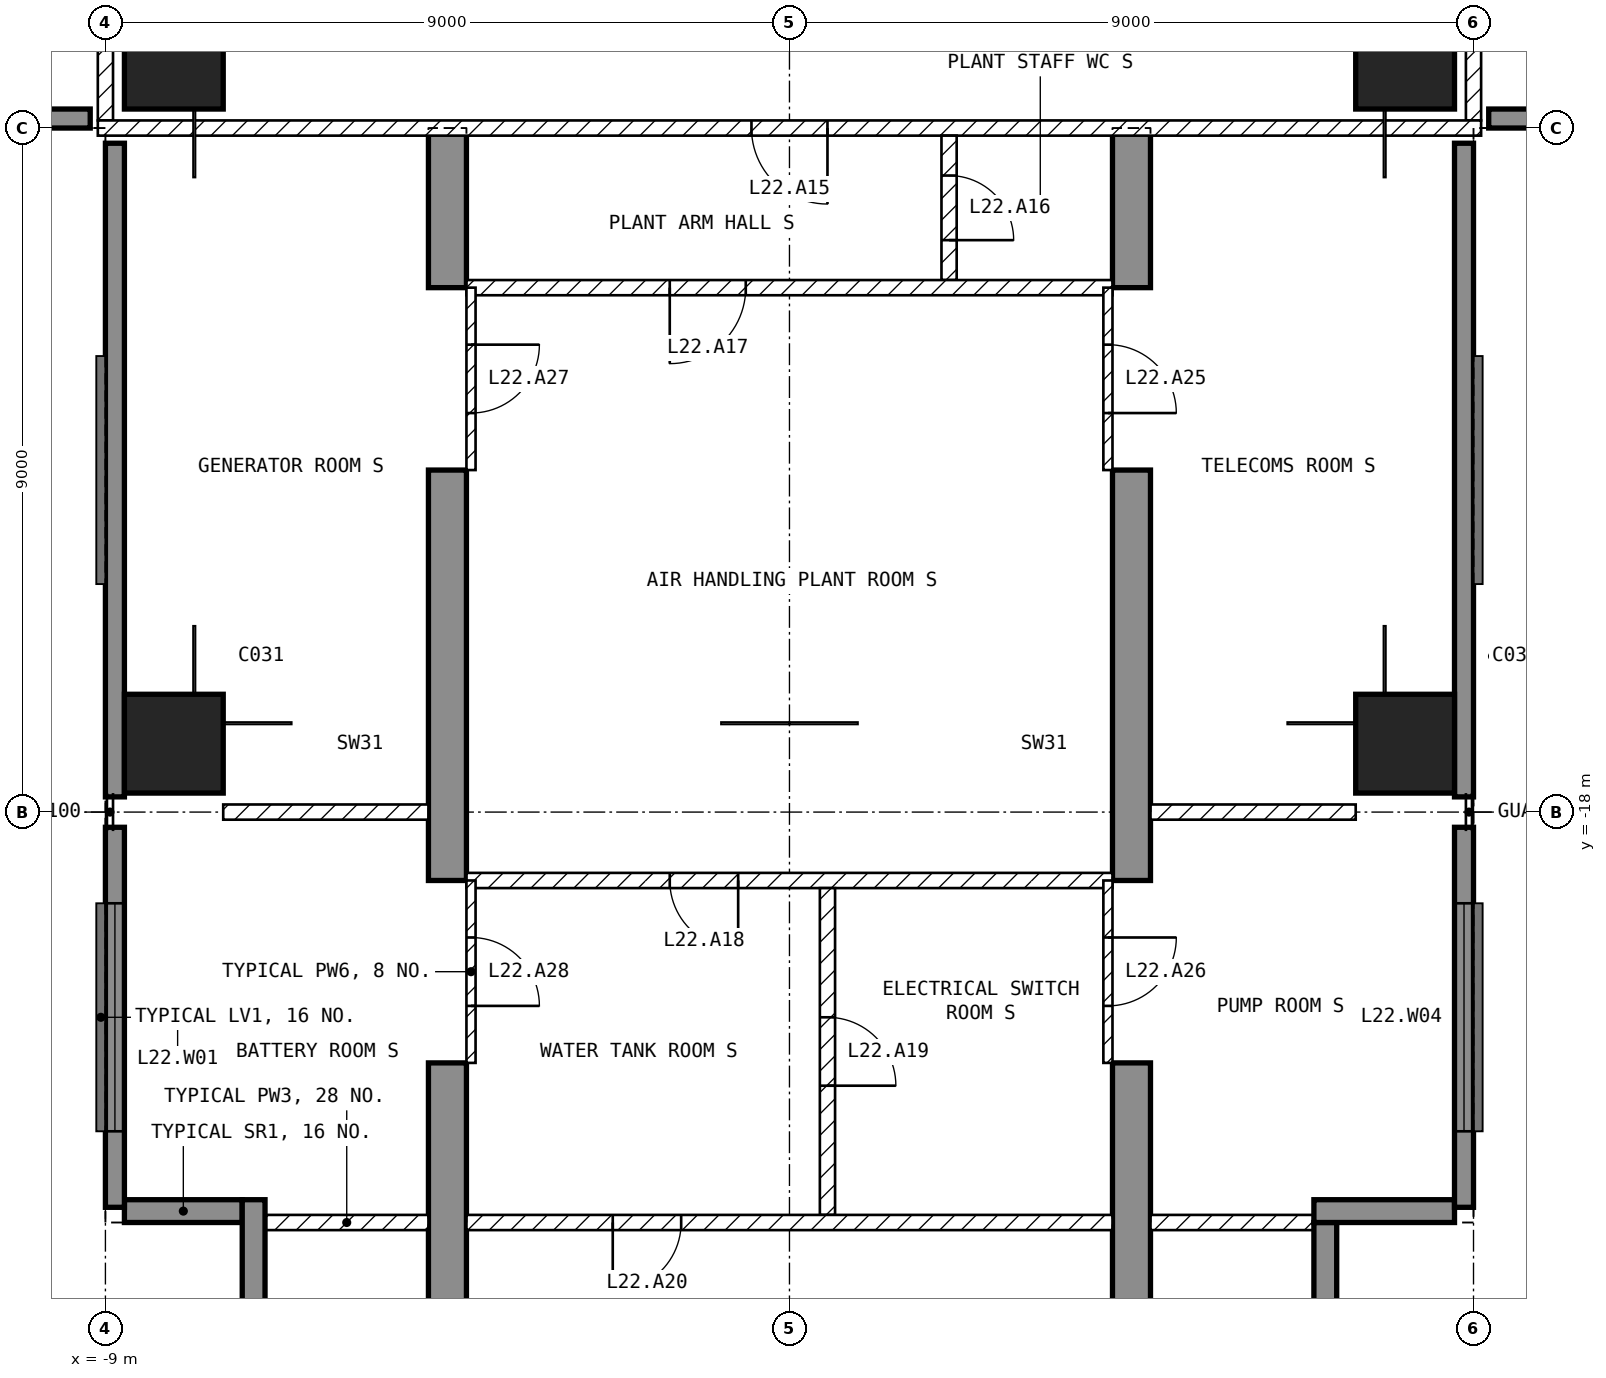
"""IFC4 building model, lengths in metres.
Left out: names, types, materials, properties, quantities, classifications, styles, units other than length and angle.
Written with IfcOpenShell. Run it as: python <this file> out.ifc"""

import sys

from ifc_helpers import new_model, si_unit, direction, frame, frame_2d, origin, origin_2d, place, context, subcontext, project, spatial, polyline, rectangle, outline, extrude, element, fill, save


model = new_model("IFC4")
c1 = context("Model", 3, precision=1e-05, world=origin(), true_north=direction((0.0, 1.0)))
c2 = subcontext(c1, "Body", "Model", "MODEL_VIEW")
j1 = project(units=[si_unit("LENGTHUNIT", "METRE"), si_unit("PLANEANGLEUNIT", "RADIAN")], contexts=[c1])
p1 = place(None, origin())
s1 = spatial("IfcSite", under=j1, at=p1, CompositionType="ELEMENT")
p2 = place(p1, origin())
s2 = spatial("IfcBuilding", under=s1, at=p2, CompositionType="ELEMENT")
p3 = place(p2, frame((0.0, 0.0, 97.9)))
s3 = spatial("IfcBuildingStorey", under=s2, at=p3, CompositionType="ELEMENT", Elevation=97.9)
for number, where, z_axis, x_axis in (
    (1, (-8.1, -17.1, -0.45), (0.0, 0.0, 1.0), (1.0, 0.0, 0.0)),
    (2, (-8.1, -8.1, -0.45), (0.0, 0.0, 1.0), (1.0, 0.0, 0.0)),
    (3, (8.1, -17.1, -0.45), (0.0, 0.0, 1.0), (1.0, 0.0, 0.0)),
    (4, (8.1, -8.1, -0.45), (0.0, 0.0, 1.0), (1.0, 0.0, 0.0)),
):
    element("IfcColumn", number, at=place(p3, frame(where, z_axis=z_axis, x_axis=x_axis)), inside=s3, PredefinedType="COLUMN", context=c2, shape_type="SweptSolid", body=[
        extrude(rectangle(XDim=1.3, YDim=1.3, at=origin_2d()), origin(), (0.0, 0.0, 1.0), 4.7),
    ])
for number, where, z_axis, x_axis in (
    (5, (-4.75, -25.2, -0.45), (1.0, 0.0, 0.0), (0.0, 1.0, 0.0)),
    (6, (4.25, -25.2, -0.45), (1.0, 0.0, 0.0), (0.0, 1.0, 0.0)),
):
    element("IfcWall", number, at=place(p3, frame(where, z_axis=z_axis, x_axis=x_axis)), inside=s3, PredefinedType="SHEAR", context=c2, shape_type="SweptSolid", body=[
        extrude(outline(polyline([(0.0, 0.0), (3.9, 0.0), (3.9, 2.85), (6.3, 2.85), (6.3, 0.0), (11.7, 0.0), (11.7, 2.85), (14.1, 2.85), (14.1, 0.0), (16.2, 0.0), (16.2, 4.7), (0.0, 4.7), (0.0, 0.0)])), origin(), (0.0, 0.0, 1.0), 0.5),
    ])
for number, where, z_axis, x_axis in (
    (7, (-17.8, -8.875, 0.0), (0.0, 0.0, 1.0), (1.0, 0.0, 0.0)),
    (8, (-8.875, -9.2, 0.0), (0.0, 0.0, 1.0), (0.0, -1.0, 0.0)),
):
    element("IfcWall", number, at=place(p3, frame(where, z_axis=z_axis, x_axis=x_axis)), inside=s3, PredefinedType="SOLIDWALL", context=c2, shape_type="SweptSolid", body=[
        extrude(rectangle(XDim=8.6, YDim=0.25, at=frame_2d((4.3, 0.0))), origin(), (0.0, 0.0, 1.0), 4.25),
    ])
p4 = place(p3, frame((-8.875, -18.2, 0.0), z_axis=(0.0, 0.0, 1.0), x_axis=(0.0, -1.0, 0.0)))
e9 = element("IfcWall", 9, at=p4, inside=s3, PredefinedType="SOLIDWALL", context=c2, shape_type="SweptSolid", body=[
    extrude(rectangle(XDim=5.0, YDim=0.25, at=frame_2d((2.5, 0.0))), origin(), (0.0, 0.0, 1.0), 4.25),
])
p5 = place(p4, frame((1.0, 0.0, 1.0)))
e10 = element("IfcOpeningElement", 10, at=p5, cuts=e9, PredefinedType="OPENING", context=c2, shape_type="SweptSolid", body=[
    extrude(rectangle(XDim=3.0, YDim=2.4, at=frame_2d((1.5, 1.2))), frame((0.0, 0.135, 0.0), z_axis=(0.0, -1.0, 0.0), x_axis=(1.0, 0.0, 0.0)), (0.0, 0.0, 1.0), 0.27),
])
p6 = place(p3, frame((8.875, -23.2, 0.0), z_axis=(0.0, 0.0, 1.0), x_axis=(0.0, 1.0, 0.0)))
e11 = element("IfcWall", 11, at=p6, inside=s3, PredefinedType="SOLIDWALL", context=c2, shape_type="SweptSolid", body=[
    extrude(rectangle(XDim=5.0, YDim=0.25, at=frame_2d((2.5, 0.0))), origin(), (0.0, 0.0, 1.0), 4.25),
])
p7 = place(p6, frame((1.0, 0.0, 1.0)))
e12 = element("IfcOpeningElement", 12, at=p7, cuts=e11, PredefinedType="OPENING", context=c2, shape_type="SweptSolid", body=[
    extrude(rectangle(XDim=3.0, YDim=2.4, at=frame_2d((1.5, 1.2))), frame((0.0, 0.135, 0.0), z_axis=(0.0, -1.0, 0.0), x_axis=(1.0, 0.0, 0.0)), (0.0, 0.0, 1.0), 0.27),
])
for number, where, z_axis, x_axis in (
    (13, (8.875, -17.8, 0.0), (0.0, 0.0, 1.0), (0.0, 1.0, 0.0)),
    (14, (9.2, -8.875, 0.0), (0.0, 0.0, 1.0), (1.0, 0.0, 0.0)),
):
    element("IfcWall", number, at=place(p3, frame(where, z_axis=z_axis, x_axis=x_axis)), inside=s3, PredefinedType="SOLIDWALL", context=c2, shape_type="SweptSolid", body=[
        extrude(rectangle(XDim=8.6, YDim=0.25, at=frame_2d((4.3, 0.0))), origin(), (0.0, 0.0, 1.0), 4.25),
    ])
p8 = place(p3, frame((7.05, -25.2, 0.0), z_axis=(0.0, 0.0, 1.0), x_axis=(0.0, 1.0, 0.0)))
e15 = element("IfcWall", 15, at=p8, inside=s3, PredefinedType="SOLIDWALL", context=c2, shape_type="SweptSolid", body=[
    extrude(rectangle(XDim=1.8, YDim=0.3, at=frame_2d((0.9, 0.0))), origin(), (0.0, 0.0, 1.0), 4.25),
])
p9 = place(p3, frame((6.9, -23.25, 0.0), z_axis=(0.0, 0.0, 1.0), x_axis=(1.0, 0.0, 0.0)))
e16 = element("IfcWall", 16, at=p9, inside=s3, PredefinedType="SOLIDWALL", context=c2, shape_type="SweptSolid", body=[
    extrude(rectangle(XDim=1.85, YDim=0.3, at=frame_2d((0.925, 0.0))), origin(), (0.0, 0.0, 1.0), 4.25),
])
p10 = place(p3, frame((-8.75, -23.25, 0.0), z_axis=(0.0, 0.0, 1.0), x_axis=(1.0, 0.0, 0.0)))
e17 = element("IfcWall", 17, at=p10, inside=s3, PredefinedType="SOLIDWALL", context=c2, shape_type="SweptSolid", body=[
    extrude(rectangle(XDim=1.55, YDim=0.3, at=frame_2d((0.775, 0.0))), origin(), (0.0, 0.0, 1.0), 4.25),
])
p11 = place(p3, frame((-7.05, -23.1, 0.0), z_axis=(0.0, 0.0, 1.0), x_axis=(0.0, -1.0, 0.0)))
e18 = element("IfcWall", 18, at=p11, inside=s3, PredefinedType="SOLIDWALL", context=c2, shape_type="SweptSolid", body=[
    extrude(rectangle(XDim=1.8, YDim=0.3, at=frame_2d((0.9, 0.0))), origin(), (0.0, 0.0, 1.0), 4.25),
])
for number, where, z_axis, x_axis in (
    (19, (9.0, -1.3, 0.0), (0.0, 0.0, 1.0), (0.0, -1.0, 0.0)),
    (20, (-9.0, -8.9, 0.0), (0.0, 0.0, 1.0), (0.0, 1.0, 0.0)),
):
    element("IfcWall", number, at=place(p3, frame(where, z_axis=z_axis, x_axis=x_axis)), inside=s3, PredefinedType="PARTITIONING", context=c2, shape_type="SweptSolid", body=[
        extrude(rectangle(XDim=7.6, YDim=0.2, at=frame_2d((3.8, 0.0))), origin(), (0.0, 0.0, 1.0), 4.25),
    ])
p12 = place(p3, frame((9.1, -9.0, 0.0), z_axis=(0.0, 0.0, 1.0), x_axis=(-1.0, 0.0, 0.0)))
e21 = element("IfcWall", 21, at=p12, inside=s3, PredefinedType="PARTITIONING", context=c2, shape_type="SweptSolid", body=[
    extrude(rectangle(XDim=18.2, YDim=0.2, at=frame_2d((9.1, 0.0))), origin(), (0.0, 0.0, 1.0), 4.25),
])
p13 = place(p12, frame((8.6, 0.0, 0.0)))
e22 = element("IfcOpeningElement", 22, at=p13, cuts=e21, PredefinedType="OPENING", context=c2, shape_type="SweptSolid", body=[
    extrude(rectangle(XDim=1.0, YDim=2.1, at=frame_2d((0.5, 1.05))), frame((0.0, 0.11, 0.0), z_axis=(0.0, -1.0, 0.0), x_axis=(1.0, 0.0, 0.0)), (0.0, 0.0, 1.0), 0.22),
])
p14 = place(p3, frame((2.1, -9.1, 0.0), z_axis=(0.0, 0.0, 1.0), x_axis=(0.0, -1.0, 0.0)))
e23 = element("IfcWall", 23, at=p14, inside=s3, PredefinedType="PARTITIONING", context=c2, shape_type="SweptSolid", body=[
    extrude(rectangle(XDim=1.9, YDim=0.2, at=frame_2d((0.95, 0.0))), origin(), (0.0, 0.0, 1.0), 4.25),
])
p15 = place(p14, frame((0.525, 0.0, 0.0)))
e24 = element("IfcOpeningElement", 24, at=p15, cuts=e23, PredefinedType="OPENING", context=c2, shape_type="SweptSolid", body=[
    extrude(rectangle(XDim=0.85, YDim=2.1, at=frame_2d((0.425, 1.05))), frame((0.0, 0.11, 0.0), z_axis=(0.0, -1.0, 0.0), x_axis=(1.0, 0.0, 0.0)), (0.0, 0.0, 1.0), 0.22),
])
p16 = place(p3, frame((4.25, -11.1, 0.0), z_axis=(0.0, 0.0, 1.0), x_axis=(-1.0, 0.0, 0.0)))
e25 = element("IfcWall", 25, at=p16, inside=s3, PredefinedType="PARTITIONING", context=c2, shape_type="SweptSolid", body=[
    extrude(rectangle(XDim=8.5, YDim=0.2, at=frame_2d((4.25, 0.0))), origin(), (0.0, 0.0, 1.0), 4.25),
])
p17 = place(p16, frame((4.825, 0.0, 0.0)))
e26 = element("IfcOpeningElement", 26, at=p17, cuts=e25, PredefinedType="OPENING", context=c2, shape_type="SweptSolid", body=[
    extrude(rectangle(XDim=1.0, YDim=2.1, at=frame_2d((0.5, 1.05))), frame((0.0, 0.11, 0.0), z_axis=(0.0, -1.0, 0.0), x_axis=(1.0, 0.0, 0.0)), (0.0, 0.0, 1.0), 0.22),
])
p18 = place(p3, frame((4.25, -18.9, 0.0), z_axis=(0.0, 0.0, 1.0), x_axis=(-1.0, 0.0, 0.0)))
e27 = element("IfcWall", 27, at=p18, inside=s3, PredefinedType="PARTITIONING", context=c2, shape_type="SweptSolid", body=[
    extrude(rectangle(XDim=8.5, YDim=0.2, at=frame_2d((4.25, 0.0))), origin(), (0.0, 0.0, 1.0), 4.25),
])
p19 = place(p18, frame((4.925, 0.0, 0.0)))
e28 = element("IfcOpeningElement", 28, at=p19, cuts=e27, PredefinedType="OPENING", context=c2, shape_type="SweptSolid", body=[
    extrude(rectangle(XDim=0.9, YDim=2.1, at=frame_2d((0.45, 1.05))), frame((0.0, 0.11, 0.0), z_axis=(0.0, -1.0, 0.0), x_axis=(1.0, 0.0, 0.0)), (0.0, 0.0, 1.0), 0.22),
])
p20 = place(p3, frame((0.5, -19.0, 0.0), z_axis=(0.0, 0.0, 1.0), x_axis=(0.0, -1.0, 0.0)))
e29 = element("IfcWall", 29, at=p20, inside=s3, PredefinedType="PARTITIONING", context=c2, shape_type="SweptSolid", body=[
    extrude(rectangle(XDim=4.3, YDim=0.2, at=frame_2d((2.15, 0.0))), origin(), (0.0, 0.0, 1.0), 4.25),
])
p21 = place(p20, frame((1.7, 0.0, 0.0)))
e30 = element("IfcOpeningElement", 30, at=p21, cuts=e29, PredefinedType="OPENING", context=c2, shape_type="SweptSolid", body=[
    extrude(rectangle(XDim=0.9, YDim=2.1, at=frame_2d((0.45, 1.05))), frame((0.0, 0.11, 0.0), z_axis=(0.0, -1.0, 0.0), x_axis=(1.0, 0.0, 0.0)), (0.0, 0.0, 1.0), 0.22),
])
p22 = place(p3, frame((4.25, -23.4, 0.0), z_axis=(0.0, 0.0, 1.0), x_axis=(-1.0, 0.0, 0.0)))
e31 = element("IfcWall", 31, at=p22, inside=s3, PredefinedType="PARTITIONING", context=c2, shape_type="SweptSolid", body=[
    extrude(rectangle(XDim=8.5, YDim=0.2, at=frame_2d((4.25, 0.0))), origin(), (0.0, 0.0, 1.0), 4.25),
])
p23 = place(p22, frame((5.675, 0.0, 0.0)))
e32 = element("IfcOpeningElement", 32, at=p23, cuts=e31, PredefinedType="OPENING", context=c2, shape_type="SweptSolid", body=[
    extrude(rectangle(XDim=0.9, YDim=2.1, at=frame_2d((0.45, 1.05))), frame((0.0, 0.11, 0.0), z_axis=(0.0, -1.0, 0.0), x_axis=(1.0, 0.0, 0.0)), (0.0, 0.0, 1.0), 0.22),
])
p24 = place(p3, frame((7.45, -18.0, 0.0), z_axis=(0.0, 0.0, 1.0), x_axis=(-1.0, 0.0, 0.0)))
e33 = element("IfcWall", 33, at=p24, inside=s3, PredefinedType="PARTITIONING", context=c2, shape_type="SweptSolid", body=[
    extrude(rectangle(XDim=2.7, YDim=0.2, at=frame_2d((1.35, 0.0))), origin(), (0.0, 0.0, 1.0), 4.25),
])
p25 = place(p3, frame((6.9, -23.4, 0.0), z_axis=(0.0, 0.0, 1.0), x_axis=(-1.0, 0.0, 0.0)))
e34 = element("IfcWall", 34, at=p25, inside=s3, PredefinedType="PARTITIONING", context=c2, shape_type="SweptSolid", body=[
    extrude(rectangle(XDim=2.15, YDim=0.2, at=frame_2d((1.075, 0.0))), origin(), (0.0, 0.0, 1.0), 4.25),
])
p26 = place(p3, frame((-4.75, -18.0, 0.0), z_axis=(0.0, 0.0, 1.0), x_axis=(-1.0, 0.0, 0.0)))
e35 = element("IfcWall", 35, at=p26, inside=s3, PredefinedType="PARTITIONING", context=c2, shape_type="SweptSolid", body=[
    extrude(rectangle(XDim=2.7, YDim=0.2, at=frame_2d((1.35, 0.0))), origin(), (0.0, 0.0, 1.0), 4.25),
])
p27 = place(p3, frame((-4.75, -23.4, 0.0), z_axis=(0.0, 0.0, 1.0), x_axis=(-1.0, 0.0, 0.0)))
e36 = element("IfcWall", 36, at=p27, inside=s3, PredefinedType="PARTITIONING", context=c2, shape_type="SweptSolid", body=[
    extrude(rectangle(XDim=2.15, YDim=0.2, at=frame_2d((1.075, 0.0))), origin(), (0.0, 0.0, 1.0), 4.25),
])
p28 = place(p3, frame((4.19, -11.1, 0.0), z_axis=(0.0, 0.0, 1.0), x_axis=(0.0, -1.0, 0.0)))
e37 = element("IfcWall", 37, at=p28, inside=s3, PredefinedType="PARTITIONING", context=c2, shape_type="SweptSolid", body=[
    extrude(rectangle(XDim=2.4, YDim=0.12, at=frame_2d((1.2, 0.0))), origin(), (0.0, 0.0, 1.0), 2.4),
])
p29 = place(p28, frame((0.75, 0.0, 0.0)))
e38 = element("IfcOpeningElement", 38, at=p29, cuts=e37, PredefinedType="OPENING", context=c2, shape_type="SweptSolid", body=[
    extrude(rectangle(XDim=0.9, YDim=2.1, at=frame_2d((0.45, 1.05))), frame((0.0, 0.07, 0.0), z_axis=(0.0, -1.0, 0.0), x_axis=(1.0, 0.0, 0.0)), (0.0, 0.0, 1.0), 0.14),
])
p30 = place(p3, frame((4.19, -18.9, 0.0), z_axis=(0.0, 0.0, 1.0), x_axis=(0.0, -1.0, 0.0)))
e39 = element("IfcWall", 39, at=p30, inside=s3, PredefinedType="PARTITIONING", context=c2, shape_type="SweptSolid", body=[
    extrude(rectangle(XDim=2.4, YDim=0.12, at=frame_2d((1.2, 0.0))), origin(), (0.0, 0.0, 1.0), 2.4),
])
p31 = place(p30, frame((0.75, 0.0, 0.0)))
e40 = element("IfcOpeningElement", 40, at=p31, cuts=e39, PredefinedType="OPENING", context=c2, shape_type="SweptSolid", body=[
    extrude(rectangle(XDim=0.9, YDim=2.1, at=frame_2d((0.45, 1.05))), frame((0.0, 0.07, 0.0), z_axis=(0.0, -1.0, 0.0), x_axis=(1.0, 0.0, 0.0)), (0.0, 0.0, 1.0), 0.14),
])
p32 = place(p3, frame((-4.19, -11.1, 0.0), z_axis=(0.0, 0.0, 1.0), x_axis=(0.0, -1.0, 0.0)))
e41 = element("IfcWall", 41, at=p32, inside=s3, PredefinedType="PARTITIONING", context=c2, shape_type="SweptSolid", body=[
    extrude(rectangle(XDim=2.4, YDim=0.12, at=frame_2d((1.2, 0.0))), origin(), (0.0, 0.0, 1.0), 2.4),
])
p33 = place(p32, frame((0.75, 0.0, 0.0)))
e42 = element("IfcOpeningElement", 42, at=p33, cuts=e41, PredefinedType="OPENING", context=c2, shape_type="SweptSolid", body=[
    extrude(rectangle(XDim=0.9, YDim=2.1, at=frame_2d((0.45, 1.05))), frame((0.0, 0.07, 0.0), z_axis=(0.0, -1.0, 0.0), x_axis=(1.0, 0.0, 0.0)), (0.0, 0.0, 1.0), 0.14),
])
p34 = place(p3, frame((-4.19, -18.9, 0.0), z_axis=(0.0, 0.0, 1.0), x_axis=(0.0, -1.0, 0.0)))
e43 = element("IfcWall", 43, at=p34, inside=s3, PredefinedType="PARTITIONING", context=c2, shape_type="SweptSolid", body=[
    extrude(rectangle(XDim=2.4, YDim=0.12, at=frame_2d((1.2, 0.0))), origin(), (0.0, 0.0, 1.0), 2.4),
])
p35 = place(p34, frame((0.75, 0.0, 0.0)))
e44 = element("IfcOpeningElement", 44, at=p35, cuts=e43, PredefinedType="OPENING", context=c2, shape_type="SweptSolid", body=[
    extrude(rectangle(XDim=0.9, YDim=2.1, at=frame_2d((0.45, 1.05))), frame((0.0, 0.07, 0.0), z_axis=(0.0, -1.0, 0.0), x_axis=(1.0, 0.0, 0.0)), (0.0, 0.0, 1.0), 0.14),
])
p36 = place(p5, origin())
e45 = element("IfcWindow", 45, at=p36, inside=s3, PartitioningType="SINGLE_PANEL", PredefinedType="WINDOW", context=c2, shape_type="SweptSolid", body=[
    extrude(rectangle(XDim=3.0, YDim=2.4, at=frame_2d((1.5, 1.2))), frame((0.0, 0.03, 0.0), z_axis=(0.0, -1.0, 0.0), x_axis=(1.0, 0.0, 0.0)), (0.0, 0.0, 1.0), 0.06),
])
fill(e10, e45)
p37 = place(p7, origin())
e46 = element("IfcWindow", 46, at=p37, inside=s3, PartitioningType="SINGLE_PANEL", PredefinedType="WINDOW", context=c2, shape_type="SweptSolid", body=[
    extrude(rectangle(XDim=3.0, YDim=2.4, at=frame_2d((1.5, 1.2))), frame((0.0, 0.03, 0.0), z_axis=(0.0, -1.0, 0.0), x_axis=(1.0, 0.0, 0.0)), (0.0, 0.0, 1.0), 0.06),
])
fill(e12, e46)
p38 = place(p13, origin())
e47 = element("IfcDoor", 47, at=p38, inside=s3, OperationType="SINGLE_SWING_LEFT", PredefinedType="DOOR", context=c2, shape_type="SweptSolid", body=[
    extrude(rectangle(XDim=1.0, YDim=2.1, at=frame_2d((0.5, 1.05))), frame((0.0, 0.025, 0.0), z_axis=(0.0, -1.0, 0.0), x_axis=(1.0, 0.0, 0.0)), (0.0, 0.0, 1.0), 0.05),
])
fill(e22, e47)
p39 = place(p15, origin())
e48 = element("IfcDoor", 48, at=p39, inside=s3, OperationType="SINGLE_SWING_RIGHT", PredefinedType="DOOR", context=c2, shape_type="SweptSolid", body=[
    extrude(rectangle(XDim=0.85, YDim=2.1, at=frame_2d((0.425, 1.05))), frame((0.0, 0.025, 0.0), z_axis=(0.0, -1.0, 0.0), x_axis=(1.0, 0.0, 0.0)), (0.0, 0.0, 1.0), 0.05),
])
fill(e24, e48)
p40 = place(p17, origin())
e49 = element("IfcDoor", 49, at=p40, inside=s3, OperationType="SINGLE_SWING_RIGHT", PredefinedType="DOOR", context=c2, shape_type="SweptSolid", body=[
    extrude(rectangle(XDim=1.0, YDim=2.1, at=frame_2d((0.5, 1.05))), frame((0.0, 0.025, 0.0), z_axis=(0.0, -1.0, 0.0), x_axis=(1.0, 0.0, 0.0)), (0.0, 0.0, 1.0), 0.05),
])
fill(e26, e49)
p41 = place(p19, origin())
e50 = element("IfcDoor", 50, at=p41, inside=s3, OperationType="SINGLE_SWING_LEFT", PredefinedType="DOOR", context=c2, shape_type="SweptSolid", body=[
    extrude(rectangle(XDim=0.9, YDim=2.1, at=frame_2d((0.45, 1.05))), frame((0.0, 0.025, 0.0), z_axis=(0.0, -1.0, 0.0), x_axis=(1.0, 0.0, 0.0)), (0.0, 0.0, 1.0), 0.05),
])
fill(e28, e50)
p42 = place(p21, origin())
e51 = element("IfcDoor", 51, at=p42, inside=s3, OperationType="SINGLE_SWING_RIGHT", PredefinedType="DOOR", context=c2, shape_type="SweptSolid", body=[
    extrude(rectangle(XDim=0.9, YDim=2.1, at=frame_2d((0.45, 1.05))), frame((0.0, 0.025, 0.0), z_axis=(0.0, -1.0, 0.0), x_axis=(1.0, 0.0, 0.0)), (0.0, 0.0, 1.0), 0.05),
])
fill(e30, e51)
p43 = place(p23, origin())
e52 = element("IfcDoor", 52, at=p43, inside=s3, OperationType="SINGLE_SWING_RIGHT", PredefinedType="DOOR", context=c2, shape_type="SweptSolid", body=[
    extrude(rectangle(XDim=0.9, YDim=2.1, at=frame_2d((0.45, 1.05))), frame((0.0, 0.025, 0.0), z_axis=(0.0, -1.0, 0.0), x_axis=(1.0, 0.0, 0.0)), (0.0, 0.0, 1.0), 0.05),
])
fill(e32, e52)
p44 = place(p29, origin())
e53 = element("IfcDoor", 53, at=p44, inside=s3, OperationType="SINGLE_SWING_RIGHT", PredefinedType="DOOR", context=c2, shape_type="SweptSolid", body=[
    extrude(rectangle(XDim=0.9, YDim=2.1, at=frame_2d((0.45, 1.05))), frame((0.0, 0.025, 0.0), z_axis=(0.0, -1.0, 0.0), x_axis=(1.0, 0.0, 0.0)), (0.0, 0.0, 1.0), 0.05),
])
fill(e38, e53)
p45 = place(p31, origin())
e54 = element("IfcDoor", 54, at=p45, inside=s3, OperationType="SINGLE_SWING_LEFT", PredefinedType="DOOR", context=c2, shape_type="SweptSolid", body=[
    extrude(rectangle(XDim=0.9, YDim=2.1, at=frame_2d((0.45, 1.05))), frame((0.0, 0.025, 0.0), z_axis=(0.0, -1.0, 0.0), x_axis=(1.0, 0.0, 0.0)), (0.0, 0.0, 1.0), 0.05),
])
fill(e40, e54)
p46 = place(p33, origin())
e55 = element("IfcDoor", 55, at=p46, inside=s3, OperationType="SINGLE_SWING_LEFT", PredefinedType="DOOR", context=c2, shape_type="SweptSolid", body=[
    extrude(rectangle(XDim=0.9, YDim=2.1, at=frame_2d((0.45, 1.05))), frame((0.0, 0.025, 0.0), z_axis=(0.0, -1.0, 0.0), x_axis=(1.0, 0.0, 0.0)), (0.0, 0.0, 1.0), 0.05),
])
fill(e42, e55)
p47 = place(p35, origin())
e56 = element("IfcDoor", 56, at=p47, inside=s3, OperationType="SINGLE_SWING_RIGHT", PredefinedType="DOOR", context=c2, shape_type="SweptSolid", body=[
    extrude(rectangle(XDim=0.9, YDim=2.1, at=frame_2d((0.45, 1.05))), frame((0.0, 0.025, 0.0), z_axis=(0.0, -1.0, 0.0), x_axis=(1.0, 0.0, 0.0)), (0.0, 0.0, 1.0), 0.05),
])
fill(e44, e56)
save(model, sys.argv[1])
